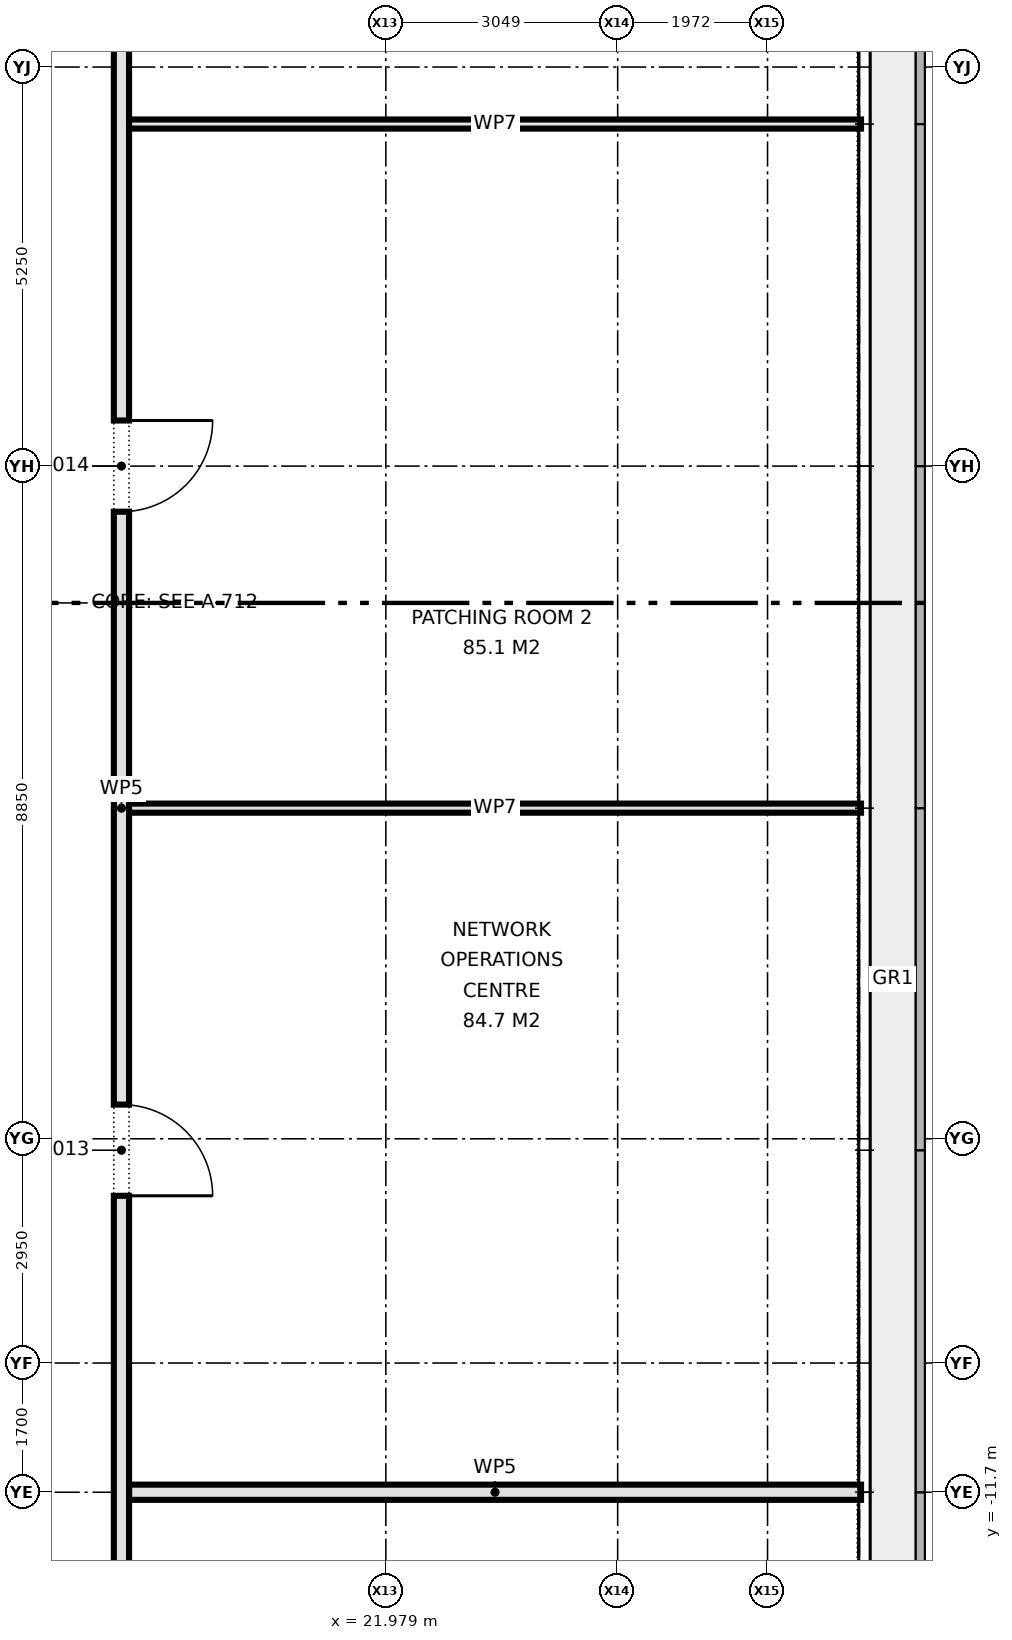
"""IFC4 building model, lengths in metres.
Left out: names, types, materials, properties, quantities, classifications, styles, units other than length and angle.
Written with IfcOpenShell. Run it as: python <this file> out.ifc"""

import sys

from ifc_helpers import new_model, si_unit, direction, frame, frame_2d, origin, place, context, subcontext, project, spatial, rectangle, extrude, element, fill, save


model = new_model("IFC4")
c1 = context("Model", 3, precision=1e-05, world=origin(), true_north=direction((0.0, 1.0)))
c2 = subcontext(c1, "Body", "Model", "MODEL_VIEW")
j1 = project(units=[si_unit("LENGTHUNIT", "METRE"), si_unit("PLANEANGLEUNIT", "RADIAN")], contexts=[c1])
p1 = place(None, origin())
s1 = spatial("IfcSite", under=j1, at=p1, CompositionType="ELEMENT")
p2 = place(p1, origin())
s2 = spatial("IfcBuilding", under=s1, at=p2, CompositionType="ELEMENT")
p3 = place(p2, frame((0.0, 0.0, 86.4)))
s3 = spatial("IfcBuildingStorey", under=s2, at=p3, CompositionType="ELEMENT", Elevation=86.4)
p4 = place(p3, frame((18.6, -11.7, 0.0), z_axis=(0.0, 0.0, 1.0), x_axis=(1.0, 0.0, 0.0)))
e1 = element("IfcWall", 1, at=p4, inside=s3, PredefinedType="PARTITIONING", context=c2, shape_type="SweptSolid", body=[
    extrude(rectangle(XDim=9.63, YDim=0.2, at=frame_2d((4.815, 0.0))), origin(), (0.0, 0.0, 1.0), 4.2),
])
p5 = place(p3, frame((18.5, -13.4, 0.0), z_axis=(0.0, 0.0, 1.0), x_axis=(0.0, 1.0, 0.0)))
e2 = element("IfcWall", 2, at=p5, inside=s3, PredefinedType="PARTITIONING", context=c2, shape_type="SweptSolid", body=[
    extrude(rectangle(XDim=26.8, YDim=0.2, at=frame_2d((13.4, 0.0))), origin(), (0.0, 0.0, 1.0), 4.2),
])
p6 = place(p5, frame((5.6, 0.0, 0.0)))
e3 = element("IfcOpeningElement", 3, at=p6, cuts=e2, PredefinedType="OPENING", context=c2, shape_type="SweptSolid", body=[
    extrude(rectangle(XDim=1.2, YDim=2.1, at=frame_2d((0.6, 1.05))), frame((0.0, 0.11, 0.0), z_axis=(0.0, -1.0, 0.0), x_axis=(1.0, 0.0, 0.0)), (0.0, 0.0, 1.0), 0.22),
])
p7 = place(p5, frame((14.6, 0.0, 0.0)))
e4 = element("IfcOpeningElement", 4, at=p7, cuts=e2, PredefinedType="OPENING", context=c2, shape_type="SweptSolid", body=[
    extrude(rectangle(XDim=1.2, YDim=2.1, at=frame_2d((0.6, 1.05))), frame((0.0, 0.11, 0.0), z_axis=(0.0, -1.0, 0.0), x_axis=(1.0, 0.0, 0.0)), (0.0, 0.0, 1.0), 0.22),
])
p8 = place(p5, frame((21.05, 0.0, 0.0)))
e5 = element("IfcOpeningElement", 5, at=p8, cuts=e2, PredefinedType="OPENING", context=c2, shape_type="SweptSolid", body=[
    extrude(rectangle(XDim=1.8, YDim=2.1, at=frame_2d((0.9, 1.05))), frame((0.0, 0.11, 0.0), z_axis=(0.0, -1.0, 0.0), x_axis=(1.0, 0.0, 0.0)), (0.0, 0.0, 1.0), 0.22),
])
for number, where, z_axis, x_axis in (
    (6, (18.6, -2.7, 0.0), (0.0, 0.0, 1.0), (1.0, 0.0, 0.0)),
    (7, (18.6, 6.3, 0.0), (0.0, 0.0, 1.0), (1.0, 0.0, 0.0)),
):
    element("IfcWall", number, at=place(p3, frame(where, z_axis=z_axis, x_axis=x_axis)), inside=s3, PredefinedType="PARTITIONING", context=c2, shape_type="SweptSolid", body=[
        extrude(rectangle(XDim=9.63, YDim=0.12, at=frame_2d((4.815, 0.0))), origin(), (0.0, 0.0, 1.0), 4.2),
    ])
p9 = place(p6, frame((1.2, 0.0, 0.0), z_axis=(0.0, 0.0, 1.0), x_axis=(-1.0, 0.0, 0.0)))
e8 = element("IfcDoor", 8, at=p9, inside=s3, OperationType="SINGLE_SWING_RIGHT", PredefinedType="DOOR", context=c2, shape_type="SweptSolid", body=[
    extrude(rectangle(XDim=1.2, YDim=2.1, at=frame_2d((0.6, 1.05))), frame((0.0, 0.025, 0.0), z_axis=(0.0, -1.0, 0.0), x_axis=(1.0, 0.0, 0.0)), (0.0, 0.0, 1.0), 0.05),
])
fill(e3, e8)
p10 = place(p7, frame((1.2, 0.0, 0.0), z_axis=(0.0, 0.0, 1.0), x_axis=(-1.0, 0.0, 0.0)))
e9 = element("IfcDoor", 9, at=p10, inside=s3, OperationType="SINGLE_SWING_LEFT", PredefinedType="DOOR", context=c2, shape_type="SweptSolid", body=[
    extrude(rectangle(XDim=1.2, YDim=2.1, at=frame_2d((0.6, 1.05))), frame((0.0, 0.025, 0.0), z_axis=(0.0, -1.0, 0.0), x_axis=(1.0, 0.0, 0.0)), (0.0, 0.0, 1.0), 0.05),
])
fill(e4, e9)
save(model, sys.argv[1])
